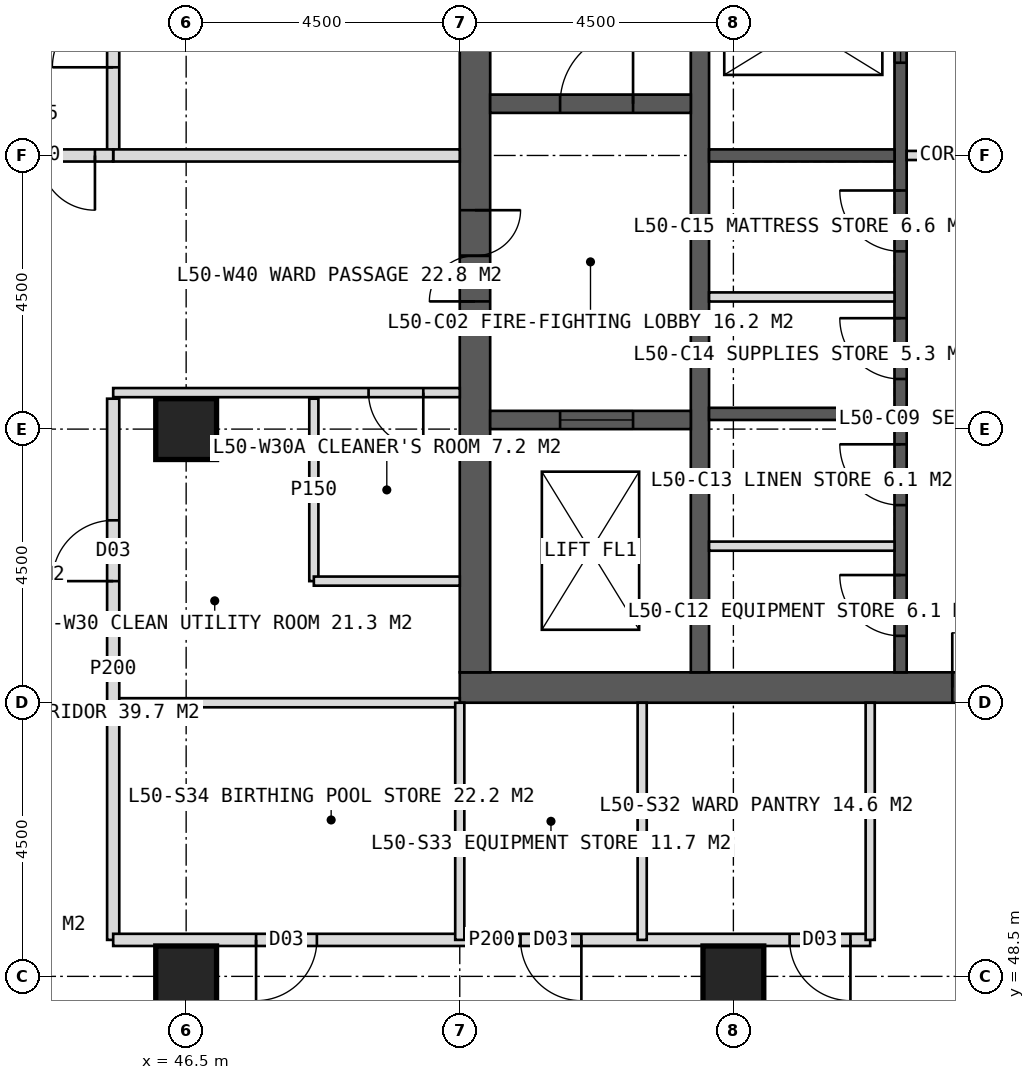
"""IFC4 building model, lengths in metres.
Left out: names, types, materials, properties, quantities, classifications, styles, units other than length and angle.
Written with IfcOpenShell. Run it as: python <this file> out.ifc"""

import sys

from ifc_helpers import new_model, si_unit, direction, frame, frame_2d, origin, origin_2d, place, context, subcontext, project, spatial, rectangle, hollow_rectangle, extrude, element, fill, save


model = new_model("IFC4")
c1 = context("Model", 3, precision=1e-05, world=origin(), true_north=direction((0.0, 1.0)))
c2 = subcontext(c1, "Body", "Model", "MODEL_VIEW")
j1 = project(units=[si_unit("LENGTHUNIT", "METRE"), si_unit("PLANEANGLEUNIT", "RADIAN")], contexts=[c1])
p1 = place(None, origin())
s1 = spatial("IfcSite", under=j1, at=p1, CompositionType="ELEMENT")
p2 = place(p1, origin())
s2 = spatial("IfcBuilding", under=s1, at=p2, CompositionType="ELEMENT")
p3 = place(p2, frame((0.0, 0.0, 209.0)))
s3 = spatial("IfcBuildingStorey", under=s2, at=p3, CompositionType="ELEMENT", Elevation=209.0)
p4 = place(p3, frame((51.0, 53.25, 0.0), z_axis=(0.0, 0.0, 1.0), x_axis=(1.0, 0.0, 0.0)))
e1 = element("IfcWall", 1, at=p4, inside=s3, PredefinedType="SHEAR", context=c2, shape_type="SweptSolid", body=[
    extrude(rectangle(XDim=18.0, YDim=0.5, at=frame_2d((9.0, 0.0))), origin(), (0.0, 0.0, 1.0), 4.0),
])
p5 = place(p4, frame((8.1, 0.0, 0.0)))
e2 = element("IfcOpeningElement", 2, at=p5, cuts=e1, PredefinedType="OPENING", context=c2, shape_type="SweptSolid", body=[
    extrude(rectangle(XDim=1.8, YDim=2.2, at=frame_2d((0.9, 1.1))), frame((0.0, 0.26, 0.0), z_axis=(0.0, -1.0, 0.0), x_axis=(1.0, 0.0, 0.0)), (0.0, 0.0, 1.0), 0.52),
])
p6 = place(p3, frame((51.25, 53.5, 0.0), z_axis=(0.0, 0.0, 1.0), x_axis=(0.0, 1.0, 0.0)))
e3 = element("IfcWall", 3, at=p6, inside=s3, PredefinedType="SHEAR", context=c2, shape_type="SweptSolid", body=[
    extrude(rectangle(XDim=17.0, YDim=0.5, at=frame_2d((8.5, 0.0))), origin(), (0.0, 0.0, 1.0), 4.0),
])
p7 = place(p6, frame((6.1, 0.0, 0.0)))
e4 = element("IfcOpeningElement", 4, at=p7, cuts=e3, PredefinedType="OPENING", context=c2, shape_type="SweptSolid", body=[
    extrude(rectangle(XDim=1.5, YDim=2.2, at=frame_2d((0.75, 1.1))), frame((0.0, 0.26, 0.0), z_axis=(0.0, -1.0, 0.0), x_axis=(1.0, 0.0, 0.0)), (0.0, 0.0, 1.0), 0.52),
])
p8 = place(p3, frame((54.95, 53.5, 0.0), z_axis=(0.0, 0.0, 1.0), x_axis=(0.0, 1.0, 0.0)))
e5 = element("IfcWall", 5, at=p8, inside=s3, PredefinedType="SHEAR", context=c2, shape_type="SweptSolid", body=[
    extrude(rectangle(XDim=17.0, YDim=0.3, at=frame_2d((8.5, 0.0))), origin(), (0.0, 0.0, 1.0), 4.0),
])
p9 = place(p3, frame((58.25, 53.5, 0.0), z_axis=(0.0, 0.0, 1.0), x_axis=(0.0, 1.0, 0.0)))
e6 = element("IfcWall", 6, at=p9, inside=s3, PredefinedType="SHEAR", context=c2, shape_type="SweptSolid", body=[
    extrude(rectangle(XDim=17.0, YDim=0.2, at=frame_2d((8.5, 0.0))), origin(), (0.0, 0.0, 1.0), 4.0),
])
p10 = place(p9, frame((0.6, 0.0, 0.0)))
e7 = element("IfcOpeningElement", 7, at=p10, cuts=e6, PredefinedType="OPENING", context=c2, shape_type="SweptSolid", body=[
    extrude(rectangle(XDim=1.0, YDim=2.1, at=frame_2d((0.5, 1.05))), frame((0.0, 0.11, 0.0), z_axis=(0.0, -1.0, 0.0), x_axis=(1.0, 0.0, 0.0)), (0.0, 0.0, 1.0), 0.22),
])
p11 = place(p9, frame((2.75, 0.0, 0.0)))
e8 = element("IfcOpeningElement", 8, at=p11, cuts=e6, PredefinedType="OPENING", context=c2, shape_type="SweptSolid", body=[
    extrude(rectangle(XDim=1.0, YDim=2.1, at=frame_2d((0.5, 1.05))), frame((0.0, 0.11, 0.0), z_axis=(0.0, -1.0, 0.0), x_axis=(1.0, 0.0, 0.0)), (0.0, 0.0, 1.0), 0.22),
])
p12 = place(p9, frame((4.824, 0.0, 0.0)))
e9 = element("IfcOpeningElement", 9, at=p12, cuts=e6, PredefinedType="OPENING", context=c2, shape_type="SweptSolid", body=[
    extrude(rectangle(XDim=1.0, YDim=2.1, at=frame_2d((0.5, 1.05))), frame((0.0, 0.11, 0.0), z_axis=(0.0, -1.0, 0.0), x_axis=(1.0, 0.0, 0.0)), (0.0, 0.0, 1.0), 0.22),
])
p13 = place(p9, frame((6.924, 0.0, 0.0)))
e10 = element("IfcOpeningElement", 10, at=p13, cuts=e6, PredefinedType="OPENING", context=c2, shape_type="SweptSolid", body=[
    extrude(rectangle(XDim=1.0, YDim=2.1, at=frame_2d((0.5, 1.05))), frame((0.0, 0.11, 0.0), z_axis=(0.0, -1.0, 0.0), x_axis=(1.0, 0.0, 0.0)), (0.0, 0.0, 1.0), 0.22),
])
p14 = place(p9, frame((10.025, 0.0, 0.0)))
e11 = element("IfcOpeningElement", 11, at=p14, cuts=e6, PredefinedType="OPENING", context=c2, shape_type="SweptSolid", body=[
    extrude(rectangle(XDim=1.4, YDim=2.2, at=frame_2d((0.7, 1.1))), frame((0.0, 0.11, 0.0), z_axis=(0.0, -1.0, 0.0), x_axis=(1.0, 0.0, 0.0)), (0.0, 0.0, 1.0), 0.22),
])
p15 = place(p9, frame((14.325, 0.0, 0.0)))
e12 = element("IfcOpeningElement", 12, at=p15, cuts=e6, PredefinedType="OPENING", context=c2, shape_type="SweptSolid", body=[
    extrude(rectangle(XDim=1.4, YDim=2.2, at=frame_2d((0.7, 1.1))), frame((0.0, 0.11, 0.0), z_axis=(0.0, -1.0, 0.0), x_axis=(1.0, 0.0, 0.0)), (0.0, 0.0, 1.0), 0.22),
])
for number, where, z_axis, x_axis in (
    (13, (55.1, 57.75, 0.0), (0.0, 0.0, 1.0), (1.0, 0.0, 0.0)),
    (14, (55.1, 62.0, 0.0), (0.0, 0.0, 1.0), (1.0, 0.0, 0.0)),
):
    element("IfcWall", number, at=place(p3, frame(where, z_axis=z_axis, x_axis=x_axis)), inside=s3, PredefinedType="SHEAR", context=c2, shape_type="SweptSolid", body=[
        extrude(rectangle(XDim=3.05, YDim=0.2, at=frame_2d((1.525, 0.0))), origin(), (0.0, 0.0, 1.0), 4.0),
    ])
p16 = place(p3, frame((51.5, 62.85, 0.0), z_axis=(0.0, 0.0, 1.0), x_axis=(1.0, 0.0, 0.0)))
e15 = element("IfcWall", 15, at=p16, inside=s3, PredefinedType="SHEAR", context=c2, shape_type="SweptSolid", body=[
    extrude(rectangle(XDim=3.3, YDim=0.3, at=frame_2d((1.65, 0.0))), origin(), (0.0, 0.0, 1.0), 4.0),
])
p17 = place(p16, frame((1.15, 0.0, 0.0)))
e16 = element("IfcOpeningElement", 16, at=p17, cuts=e15, PredefinedType="OPENING", context=c2, shape_type="SweptSolid", body=[
    extrude(rectangle(XDim=1.2, YDim=2.1, at=frame_2d((0.6, 1.05))), frame((0.0, 0.16, 0.0), z_axis=(0.0, -1.0, 0.0), x_axis=(1.0, 0.0, 0.0)), (0.0, 0.0, 1.0), 0.32),
])
p18 = place(p3, frame((51.5, 57.65, 0.0), z_axis=(0.0, 0.0, 1.0), x_axis=(1.0, 0.0, 0.0)))
e17 = element("IfcWall", 17, at=p18, inside=s3, PredefinedType="SHEAR", context=c2, shape_type="SweptSolid", body=[
    extrude(rectangle(XDim=3.3, YDim=0.3, at=frame_2d((1.65, 0.0))), origin(), (0.0, 0.0, 1.0), 4.0),
])
p19 = place(p18, frame((1.15, 0.0, 0.0)))
e18 = element("IfcOpeningElement", 18, at=p19, cuts=e17, PredefinedType="OPENING", context=c2, shape_type="SweptSolid", body=[
    extrude(rectangle(XDim=1.2, YDim=2.2, at=frame_2d((0.6, 1.1))), frame((0.0, 0.16, 0.0), z_axis=(0.0, -1.0, 0.0), x_axis=(1.0, 0.0, 0.0)), (0.0, 0.0, 1.0), 0.32),
])
for number, where, z_axis, x_axis in (
    (19, (46.5, 48.5, 0.0), (0.0, 0.0, 1.0), (1.0, 0.0, 0.0)),
    (20, (55.5, 48.5, 0.0), (0.0, 0.0, 1.0), (1.0, 0.0, 0.0)),
    (21, (46.5, 57.5, 0.0), (0.0, 0.0, 1.0), (1.0, 0.0, 0.0)),
):
    element("IfcColumn", number, at=place(p3, frame(where, z_axis=z_axis, x_axis=x_axis)), inside=s3, PredefinedType="COLUMN", context=c2, shape_type="SweptSolid", body=[
        extrude(hollow_rectangle(XDim=1.0, YDim=1.0, WallThickness=0.1, at=origin_2d()), origin(), (0.0, 0.0, 1.0), 4.0),
    ])
p20 = place(p3, frame((51.0, 53.0, 0.0), z_axis=(0.0, 0.0, 1.0), x_axis=(-1.0, 0.0, 0.0)))
e22 = element("IfcWall", 22, at=p20, inside=s3, PredefinedType="PARTITIONING", context=c2, shape_type="SweptSolid", body=[
    extrude(rectangle(XDim=5.7, YDim=0.15, at=frame_2d((2.85, 0.0))), origin(), (0.0, 0.0, 1.0), 3.75),
])
p21 = place(p3, frame((45.3, 49.1, 0.0), z_axis=(0.0, 0.0, 1.0), x_axis=(0.0, 1.0, 0.0)))
e23 = element("IfcWall", 23, at=p21, inside=s3, PredefinedType="PARTITIONING", context=c2, shape_type="SweptSolid", body=[
    extrude(rectangle(XDim=8.9, YDim=0.2, at=frame_2d((4.45, 0.0))), origin(), (0.0, 0.0, 1.0), 3.75),
])
p22 = place(p21, frame((5.9, 0.0, 0.0)))
e24 = element("IfcOpeningElement", 24, at=p22, cuts=e23, PredefinedType="OPENING", context=c2, shape_type="SweptSolid", body=[
    extrude(rectangle(XDim=1.0, YDim=2.1, at=frame_2d((0.5, 1.05))), frame((0.0, 0.11, 0.0), z_axis=(0.0, -1.0, 0.0), x_axis=(1.0, 0.0, 0.0)), (0.0, 0.0, 1.0), 0.22),
])
p23 = place(p3, frame((45.3, 62.0, 0.0), z_axis=(0.0, 0.0, 1.0), x_axis=(0.0, 1.0, 0.0)))
e25 = element("IfcWall", 25, at=p23, inside=s3, PredefinedType="PARTITIONING", context=c2, shape_type="SweptSolid", body=[
    extrude(rectangle(XDim=14.7, YDim=0.2, at=frame_2d((7.35, 0.0))), origin(), (0.0, 0.0, 1.0), 3.75),
])
p24 = place(p23, frame((1.45, 0.0, 0.0)))
e26 = element("IfcOpeningElement", 26, at=p24, cuts=e25, PredefinedType="OPENING", context=c2, shape_type="SweptSolid", body=[
    extrude(rectangle(XDim=1.0, YDim=2.1, at=frame_2d((0.5, 1.05))), frame((0.0, 0.11, 0.0), z_axis=(0.0, -1.0, 0.0), x_axis=(1.0, 0.0, 0.0)), (0.0, 0.0, 1.0), 0.22),
])
p25 = place(p23, frame((11.35, 0.0, 0.0)))
e27 = element("IfcOpeningElement", 27, at=p25, cuts=e25, PredefinedType="OPENING", context=c2, shape_type="SweptSolid", body=[
    extrude(rectangle(XDim=1.0, YDim=2.1, at=frame_2d((0.5, 1.05))), frame((0.0, 0.11, 0.0), z_axis=(0.0, -1.0, 0.0), x_axis=(1.0, 0.0, 0.0)), (0.0, 0.0, 1.0), 0.22),
])
p26 = place(p3, frame((51.0, 58.1, 0.0), z_axis=(0.0, 0.0, 1.0), x_axis=(-1.0, 0.0, 0.0)))
e28 = element("IfcWall", 28, at=p26, inside=s3, PredefinedType="PARTITIONING", context=c2, shape_type="SweptSolid", body=[
    extrude(rectangle(XDim=5.7, YDim=0.15, at=frame_2d((2.85, 0.0))), origin(), (0.0, 0.0, 1.0), 3.75),
])
p27 = place(p26, frame((0.6, 0.0, 0.0)))
e29 = element("IfcOpeningElement", 29, at=p27, cuts=e28, PredefinedType="OPENING", context=c2, shape_type="SweptSolid", body=[
    extrude(rectangle(XDim=0.9, YDim=2.1, at=frame_2d((0.45, 1.05))), frame((0.0, 0.085, 0.0), z_axis=(0.0, -1.0, 0.0), x_axis=(1.0, 0.0, 0.0)), (0.0, 0.0, 1.0), 0.17),
])
p28 = place(p3, frame((51.0, 62.0, 0.0), z_axis=(0.0, 0.0, 1.0), x_axis=(-1.0, 0.0, 0.0)))
e30 = element("IfcWall", 30, at=p28, inside=s3, PredefinedType="SOLIDWALL", context=c2, shape_type="SweptSolid", body=[
    extrude(rectangle(XDim=5.7, YDim=0.2, at=frame_2d((2.85, 0.0))), origin(), (0.0, 0.0, 1.0), 2.95),
])
p29 = place(p3, frame((48.6, 55.0, 0.0), z_axis=(0.0, 0.0, 1.0), x_axis=(0.0, 1.0, 0.0)))
e31 = element("IfcWall", 31, at=p29, inside=s3, PredefinedType="PARTITIONING", context=c2, shape_type="SweptSolid", body=[
    extrude(rectangle(XDim=3.0, YDim=0.15, at=frame_2d((1.5, 0.0))), origin(), (0.0, 0.0, 1.0), 3.75),
])
p30 = place(p3, frame((51.0, 55.0, 0.0), z_axis=(0.0, 0.0, 1.0), x_axis=(-1.0, 0.0, 0.0)))
e32 = element("IfcWall", 32, at=p30, inside=s3, PredefinedType="PARTITIONING", context=c2, shape_type="SweptSolid", body=[
    extrude(rectangle(XDim=2.4, YDim=0.15, at=frame_2d((1.2, 0.0))), origin(), (0.0, 0.0, 1.0), 3.75),
])
p31 = place(p3, frame((57.75, 49.1, 0.0), z_axis=(0.0, 0.0, 1.0), x_axis=(-1.0, 0.0, 0.0)))
e33 = element("IfcWall", 33, at=p31, inside=s3, PredefinedType="PARTITIONING", context=c2, shape_type="SweptSolid", body=[
    extrude(rectangle(XDim=12.45, YDim=0.2, at=frame_2d((6.225, 0.0))), origin(), (0.0, 0.0, 1.0), 3.75),
])
p32 = place(p31, frame((0.325, 0.0, 0.0)))
e34 = element("IfcOpeningElement", 34, at=p32, cuts=e33, PredefinedType="OPENING", context=c2, shape_type="SweptSolid", body=[
    extrude(rectangle(XDim=1.0, YDim=2.1, at=frame_2d((0.5, 1.05))), frame((0.0, 0.11, 0.0), z_axis=(0.0, -1.0, 0.0), x_axis=(1.0, 0.0, 0.0)), (0.0, 0.0, 1.0), 0.22),
])
p33 = place(p31, frame((4.75, 0.0, 0.0)))
e35 = element("IfcOpeningElement", 35, at=p33, cuts=e33, PredefinedType="OPENING", context=c2, shape_type="SweptSolid", body=[
    extrude(rectangle(XDim=1.0, YDim=2.1, at=frame_2d((0.5, 1.05))), frame((0.0, 0.11, 0.0), z_axis=(0.0, -1.0, 0.0), x_axis=(1.0, 0.0, 0.0)), (0.0, 0.0, 1.0), 0.22),
])
p34 = place(p31, frame((9.1, 0.0, 0.0)))
e36 = element("IfcOpeningElement", 36, at=p34, cuts=e33, PredefinedType="OPENING", context=c2, shape_type="SweptSolid", body=[
    extrude(rectangle(XDim=1.0, YDim=2.1, at=frame_2d((0.5, 1.05))), frame((0.0, 0.11, 0.0), z_axis=(0.0, -1.0, 0.0), x_axis=(1.0, 0.0, 0.0)), (0.0, 0.0, 1.0), 0.22),
])
for number, where, z_axis, x_axis in (
    (37, (57.75, 53.0, 0.0), (0.0, 0.0, 1.0), (0.0, -1.0, 0.0)),
    (38, (54.0, 53.0, 0.0), (0.0, 0.0, 1.0), (0.0, -1.0, 0.0)),
    (39, (51.0, 53.0, 0.0), (0.0, 0.0, 1.0), (0.0, -1.0, 0.0)),
):
    element("IfcWall", number, at=place(p3, frame(where, z_axis=z_axis, x_axis=x_axis)), inside=s3, PredefinedType="PARTITIONING", context=c2, shape_type="SweptSolid", body=[
        extrude(rectangle(XDim=3.9, YDim=0.15, at=frame_2d((1.95, 0.0))), origin(), (0.0, 0.0, 1.0), 3.75),
    ])
p35 = place(p3, frame((45.3, 62.0, 0.0), z_axis=(0.0, 0.0, 1.0), x_axis=(-1.0, 0.0, 0.0)))
e40 = element("IfcWall", 40, at=p35, inside=s3, PredefinedType="SOLIDWALL", context=c2, shape_type="SweptSolid", body=[
    extrude(rectangle(XDim=2.7, YDim=0.2, at=frame_2d((1.35, 0.0))), origin(), (0.0, 0.0, 1.0), 2.95),
])
p36 = place(p35, frame((0.3, 0.0, 0.0)))
e41 = element("IfcOpeningElement", 41, at=p36, cuts=e40, PredefinedType="OPENING", context=c2, shape_type="SweptSolid", body=[
    extrude(rectangle(XDim=1.8, YDim=2.2, at=frame_2d((0.9, 1.1))), frame((0.0, 0.11, 0.0), z_axis=(0.0, -1.0, 0.0), x_axis=(1.0, 0.0, 0.0)), (0.0, 0.0, 1.0), 0.22),
])
for number, where, z_axis, x_axis in (
    (42, (55.1, 55.575, 0.0), (0.0, 0.0, 1.0), (1.0, 0.0, 0.0)),
    (43, (55.1, 59.673, 0.0), (0.0, 0.0, 1.0), (1.0, 0.0, 0.0)),
):
    element("IfcWall", number, at=place(p3, frame(where, z_axis=z_axis, x_axis=x_axis)), inside=s3, PredefinedType="PARTITIONING", context=c2, shape_type="SweptSolid", body=[
        extrude(rectangle(XDim=3.05, YDim=0.15, at=frame_2d((1.525, 0.0))), origin(), (0.0, 0.0, 1.0), 3.75),
    ])
p37 = place(p3, frame((58.35, 62.0, 0.0), z_axis=(0.0, 0.0, 1.0), x_axis=(1.0, 0.0, 0.0)))
e44 = element("IfcWall", 44, at=p37, inside=s3, PredefinedType="PARTITIONING", context=c2, shape_type="SweptSolid", body=[
    extrude(rectangle(XDim=3.3, YDim=0.15, at=frame_2d((1.65, 0.0))), origin(), (0.0, 0.0, 1.0), 3.75),
])
p38 = place(p27, origin())
e45 = element("IfcDoor", 45, at=p38, inside=s3, OperationType="SINGLE_SWING_LEFT", PredefinedType="DOOR", context=c2, shape_type="SweptSolid", body=[
    extrude(rectangle(XDim=0.9, YDim=2.1, at=frame_2d((0.45, 1.05))), frame((0.0, 0.025, 0.0), z_axis=(0.0, -1.0, 0.0), x_axis=(1.0, 0.0, 0.0)), (0.0, 0.0, 1.0), 0.05),
])
fill(e29, e45)
p39 = place(p22, origin())
e46 = element("IfcDoor", 46, at=p39, inside=s3, OperationType="SINGLE_SWING_LEFT", PredefinedType="DOOR", context=c2, shape_type="SweptSolid", body=[
    extrude(rectangle(XDim=1.0, YDim=2.1, at=frame_2d((0.5, 1.05))), frame((0.0, 0.025, 0.0), z_axis=(0.0, -1.0, 0.0), x_axis=(1.0, 0.0, 0.0)), (0.0, 0.0, 1.0), 0.05),
])
fill(e24, e46)
p40 = place(p24, origin())
e47 = element("IfcDoor", 47, at=p40, inside=s3, OperationType="SINGLE_SWING_LEFT", PredefinedType="DOOR", context=c2, shape_type="SweptSolid", body=[
    extrude(rectangle(XDim=1.0, YDim=2.1, at=frame_2d((0.5, 1.05))), frame((0.0, 0.025, 0.0), z_axis=(0.0, -1.0, 0.0), x_axis=(1.0, 0.0, 0.0)), (0.0, 0.0, 1.0), 0.05),
])
fill(e26, e47)
p41 = place(p32, origin())
e48 = element("IfcDoor", 48, at=p41, inside=s3, OperationType="SINGLE_SWING_LEFT", PredefinedType="DOOR", context=c2, shape_type="SweptSolid", body=[
    extrude(rectangle(XDim=1.0, YDim=2.1, at=frame_2d((0.5, 1.05))), frame((0.0, 0.025, 0.0), z_axis=(0.0, -1.0, 0.0), x_axis=(1.0, 0.0, 0.0)), (0.0, 0.0, 1.0), 0.05),
])
fill(e34, e48)
p42 = place(p33, origin())
e49 = element("IfcDoor", 49, at=p42, inside=s3, OperationType="SINGLE_SWING_LEFT", PredefinedType="DOOR", context=c2, shape_type="SweptSolid", body=[
    extrude(rectangle(XDim=1.0, YDim=2.1, at=frame_2d((0.5, 1.05))), frame((0.0, 0.025, 0.0), z_axis=(0.0, -1.0, 0.0), x_axis=(1.0, 0.0, 0.0)), (0.0, 0.0, 1.0), 0.05),
])
fill(e35, e49)
p43 = place(p34, origin())
e50 = element("IfcDoor", 50, at=p43, inside=s3, OperationType="SINGLE_SWING_RIGHT", PredefinedType="DOOR", context=c2, shape_type="SweptSolid", body=[
    extrude(rectangle(XDim=1.0, YDim=2.1, at=frame_2d((0.5, 1.05))), frame((0.0, 0.025, 0.0), z_axis=(0.0, -1.0, 0.0), x_axis=(1.0, 0.0, 0.0)), (0.0, 0.0, 1.0), 0.05),
])
fill(e36, e50)
p44 = place(p36, origin())
e51 = element("IfcDoor", 51, at=p44, inside=s3, OperationType="DOUBLE_DOOR_DOUBLE_SWING", PredefinedType="DOOR", context=c2, shape_type="SweptSolid", body=[
    extrude(rectangle(XDim=1.8, YDim=2.2, at=frame_2d((0.9, 1.1))), frame((0.0, 0.025, 0.0), z_axis=(0.0, -1.0, 0.0), x_axis=(1.0, 0.0, 0.0)), (0.0, 0.0, 1.0), 0.05),
])
fill(e41, e51)
p45 = place(p7, origin())
e52 = element("IfcDoor", 52, at=p45, inside=s3, OperationType="DOUBLE_DOOR_SINGLE_SWING", PredefinedType="DOOR", context=c2, shape_type="SweptSolid", body=[
    extrude(rectangle(XDim=1.5, YDim=2.2, at=frame_2d((0.75, 1.1))), frame((0.0, 0.025, 0.0), z_axis=(0.0, -1.0, 0.0), x_axis=(1.0, 0.0, 0.0)), (0.0, 0.0, 1.0), 0.05),
])
fill(e4, e52)
p46 = place(p17, origin())
e53 = element("IfcDoor", 53, at=p46, inside=s3, OperationType="SINGLE_SWING_RIGHT", PredefinedType="DOOR", context=c2, shape_type="SweptSolid", body=[
    extrude(rectangle(XDim=1.2, YDim=2.1, at=frame_2d((0.6, 1.05))), frame((0.0, 0.025, 0.0), z_axis=(0.0, -1.0, 0.0), x_axis=(1.0, 0.0, 0.0)), (0.0, 0.0, 1.0), 0.05),
])
fill(e16, e53)
p47 = place(p19, origin())
e54 = element("IfcDoor", 54, at=p47, inside=s3, OperationType="SLIDING_TO_LEFT", PredefinedType="DOOR", context=c2, shape_type="SweptSolid", body=[
    extrude(rectangle(XDim=1.2, YDim=2.2, at=frame_2d((0.6, 1.1))), frame((0.0, 0.025, 0.0), z_axis=(0.0, -1.0, 0.0), x_axis=(1.0, 0.0, 0.0)), (0.0, 0.0, 1.0), 0.05),
])
fill(e18, e54)
p48 = place(p10, origin())
e55 = element("IfcDoor", 55, at=p48, inside=s3, OperationType="SINGLE_SWING_RIGHT", PredefinedType="DOOR", context=c2, shape_type="SweptSolid", body=[
    extrude(rectangle(XDim=1.0, YDim=2.1, at=frame_2d((0.5, 1.05))), frame((0.0, 0.025, 0.0), z_axis=(0.0, -1.0, 0.0), x_axis=(1.0, 0.0, 0.0)), (0.0, 0.0, 1.0), 0.05),
])
fill(e7, e55)
p49 = place(p11, origin())
e56 = element("IfcDoor", 56, at=p49, inside=s3, OperationType="SINGLE_SWING_RIGHT", PredefinedType="DOOR", context=c2, shape_type="SweptSolid", body=[
    extrude(rectangle(XDim=1.0, YDim=2.1, at=frame_2d((0.5, 1.05))), frame((0.0, 0.025, 0.0), z_axis=(0.0, -1.0, 0.0), x_axis=(1.0, 0.0, 0.0)), (0.0, 0.0, 1.0), 0.05),
])
fill(e8, e56)
p50 = place(p12, origin())
e57 = element("IfcDoor", 57, at=p50, inside=s3, OperationType="SINGLE_SWING_RIGHT", PredefinedType="DOOR", context=c2, shape_type="SweptSolid", body=[
    extrude(rectangle(XDim=1.0, YDim=2.1, at=frame_2d((0.5, 1.05))), frame((0.0, 0.025, 0.0), z_axis=(0.0, -1.0, 0.0), x_axis=(1.0, 0.0, 0.0)), (0.0, 0.0, 1.0), 0.05),
])
fill(e9, e57)
p51 = place(p13, origin())
e58 = element("IfcDoor", 58, at=p51, inside=s3, OperationType="SINGLE_SWING_RIGHT", PredefinedType="DOOR", context=c2, shape_type="SweptSolid", body=[
    extrude(rectangle(XDim=1.0, YDim=2.1, at=frame_2d((0.5, 1.05))), frame((0.0, 0.025, 0.0), z_axis=(0.0, -1.0, 0.0), x_axis=(1.0, 0.0, 0.0)), (0.0, 0.0, 1.0), 0.05),
])
fill(e10, e58)
p52 = place(p14, origin())
e59 = element("IfcDoor", 59, at=p52, inside=s3, OperationType="SLIDING_TO_LEFT", PredefinedType="DOOR", context=c2, shape_type="SweptSolid", body=[
    extrude(rectangle(XDim=1.4, YDim=2.2, at=frame_2d((0.7, 1.1))), frame((0.0, 0.025, 0.0), z_axis=(0.0, -1.0, 0.0), x_axis=(1.0, 0.0, 0.0)), (0.0, 0.0, 1.0), 0.05),
])
fill(e11, e59)
p53 = place(p5, origin())
e60 = element("IfcDoor", 60, at=p53, inside=s3, OperationType="DOUBLE_DOOR_SINGLE_SWING", PredefinedType="DOOR", context=c2, shape_type="SweptSolid", body=[
    extrude(rectangle(XDim=1.8, YDim=2.2, at=frame_2d((0.9, 1.1))), frame((0.0, 0.025, 0.0), z_axis=(0.0, -1.0, 0.0), x_axis=(1.0, 0.0, 0.0)), (0.0, 0.0, 1.0), 0.05),
])
fill(e2, e60)
save(model, sys.argv[1])
